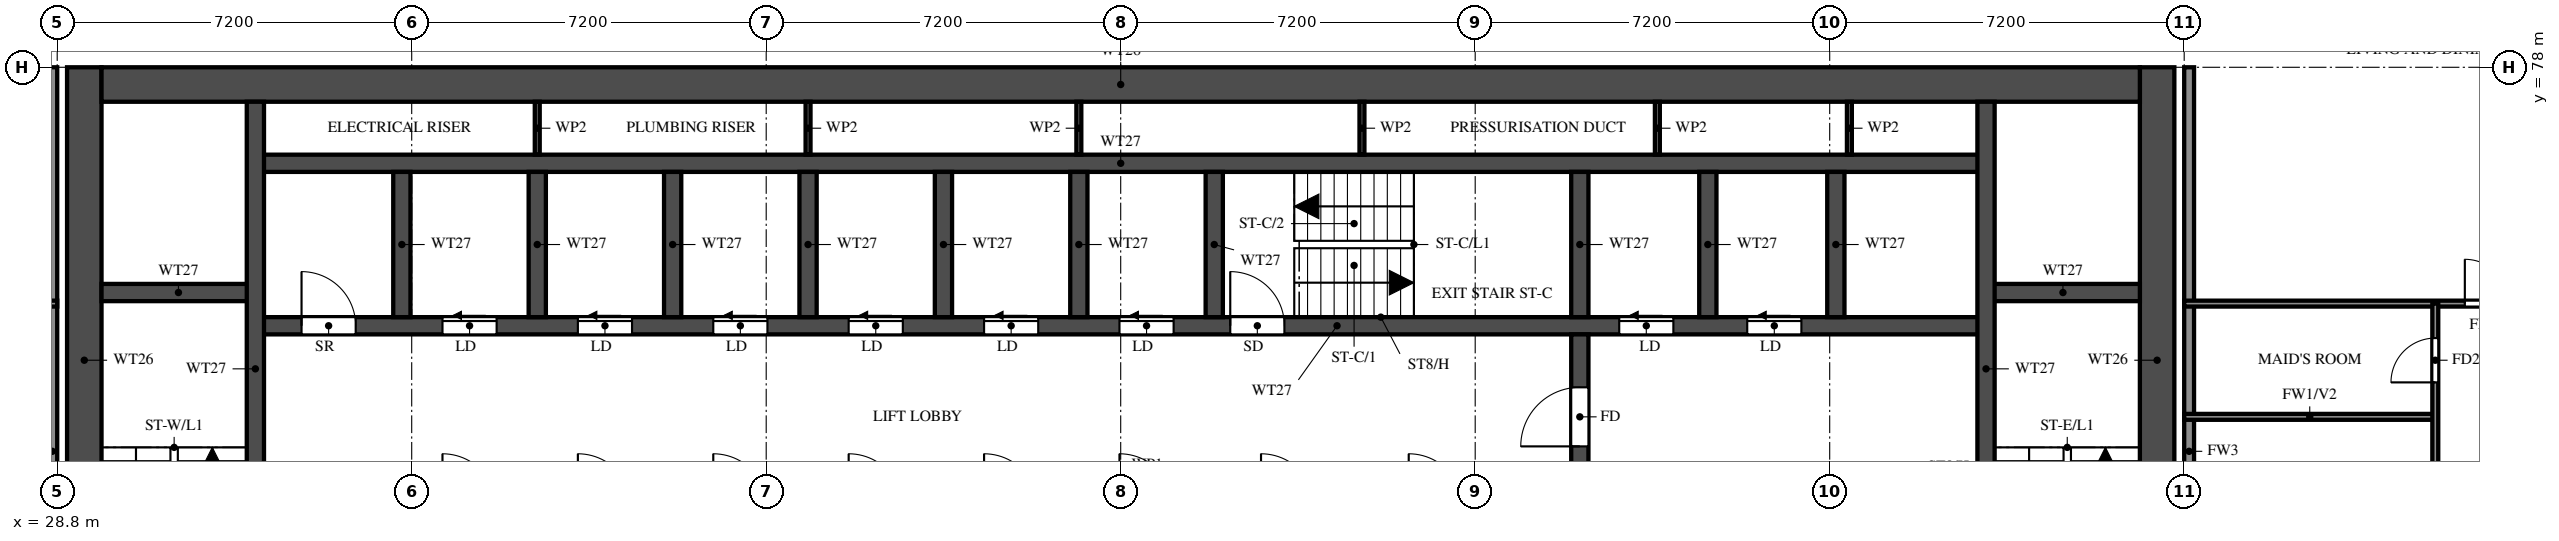
"""IFC4 building model, lengths in metres.
Left out: names, types, materials, properties, quantities, classifications, styles, units other than length and angle.
Written with IfcOpenShell. Run it as: python <this file> out.ifc"""

import sys

from ifc_helpers import new_model, si_unit, direction, frame, frame_2d, origin, place, context, subcontext, project, spatial, rectangle, extrude, element, fill, save


model = new_model("IFC4")
c1 = context("Model", 3, precision=1e-05, world=origin(), true_north=direction((0.0, 1.0)))
c2 = subcontext(c1, "Body", "Model", "MODEL_VIEW")
j1 = project(units=[si_unit("LENGTHUNIT", "METRE"), si_unit("PLANEANGLEUNIT", "RADIAN")], contexts=[c1])
p1 = place(None, origin())
s1 = spatial("IfcSite", under=j1, at=p1, CompositionType="ELEMENT")
p2 = place(p1, origin())
s2 = spatial("IfcBuilding", under=s1, at=p2, CompositionType="ELEMENT")
p3 = place(p2, frame((0.0, 0.0, 150.0)))
s3 = spatial("IfcBuildingStorey", under=s2, at=p3, CompositionType="ELEMENT", Elevation=150.0)
for number, where, z_axis, x_axis in (
    (1, (29.35, 66.1, 0.0), (0.0, 0.0, 1.0), (0.0, 1.0, 0.0)),
    (2, (71.45, 66.1, 0.0), (0.0, 0.0, 1.0), (0.0, 1.0, 0.0)),
):
    element("IfcWall", number, at=place(p3, frame(where, z_axis=z_axis, x_axis=x_axis)), inside=s3, PredefinedType="SHEAR", context=c2, shape_type="SweptSolid", body=[
        extrude(rectangle(XDim=11.9, YDim=0.7, at=frame_2d((5.95, 0.0))), origin(), (0.0, 0.0, 1.0), 3.2),
    ])
p4 = place(p3, frame((29.7, 77.65, 0.0), z_axis=(0.0, 0.0, 1.0), x_axis=(1.0, 0.0, 0.0)))
e3 = element("IfcWall", 3, at=p4, inside=s3, PredefinedType="SHEAR", context=c2, shape_type="SweptSolid", body=[
    extrude(rectangle(XDim=41.4, YDim=0.7, at=frame_2d((20.7, 0.0))), origin(), (0.0, 0.0, 1.0), 3.2),
])
p5 = place(p3, frame((32.825, 72.75, 0.0), z_axis=(0.0, 0.0, 1.0), x_axis=(1.0, 0.0, 0.0)))
e4 = element("IfcWall", 4, at=p5, inside=s3, PredefinedType="SHEAR", context=c2, shape_type="SweptSolid", body=[
    extrude(rectangle(XDim=35.15, YDim=0.35, at=frame_2d((17.575, 0.0))), origin(), (0.0, 0.0, 1.0), 3.2),
])
p6 = place(p5, frame((19.8, 0.0, 0.0)))
e5 = element("IfcOpeningElement", 5, at=p6, cuts=e4, PredefinedType="OPENING", context=c2, shape_type="SweptSolid", body=[
    extrude(rectangle(XDim=1.1, YDim=2.1, at=frame_2d((0.55, 1.05))), frame((0.0, 0.185, 0.0), z_axis=(0.0, -1.0, 0.0), x_axis=(1.0, 0.0, 0.0)), (0.0, 0.0, 1.0), 0.37),
])
p7 = place(p5, frame((27.7, 0.0, 0.0)))
e6 = element("IfcOpeningElement", 6, at=p7, cuts=e4, PredefinedType="OPENING", context=c2, shape_type="SweptSolid", body=[
    extrude(rectangle(XDim=1.1, YDim=2.1, at=frame_2d((0.55, 1.05))), frame((0.0, 0.185, 0.0), z_axis=(0.0, -1.0, 0.0), x_axis=(1.0, 0.0, 0.0)), (0.0, 0.0, 1.0), 0.37),
])
p8 = place(p5, frame((30.3, 0.0, 0.0)))
e7 = element("IfcOpeningElement", 7, at=p8, cuts=e4, PredefinedType="OPENING", context=c2, shape_type="SweptSolid", body=[
    extrude(rectangle(XDim=1.1, YDim=2.1, at=frame_2d((0.55, 1.05))), frame((0.0, 0.185, 0.0), z_axis=(0.0, -1.0, 0.0), x_axis=(1.0, 0.0, 0.0)), (0.0, 0.0, 1.0), 0.37),
])
p9 = place(p5, frame((3.8, 0.0, 0.0)))
e8 = element("IfcOpeningElement", 8, at=p9, cuts=e4, PredefinedType="OPENING", context=c2, shape_type="SweptSolid", body=[
    extrude(rectangle(XDim=1.1, YDim=2.1, at=frame_2d((0.55, 1.05))), frame((0.0, 0.185, 0.0), z_axis=(0.0, -1.0, 0.0), x_axis=(1.0, 0.0, 0.0)), (0.0, 0.0, 1.0), 0.37),
])
p10 = place(p5, frame((6.55, 0.0, 0.0)))
e9 = element("IfcOpeningElement", 9, at=p10, cuts=e4, PredefinedType="OPENING", context=c2, shape_type="SweptSolid", body=[
    extrude(rectangle(XDim=1.1, YDim=2.1, at=frame_2d((0.55, 1.05))), frame((0.0, 0.185, 0.0), z_axis=(0.0, -1.0, 0.0), x_axis=(1.0, 0.0, 0.0)), (0.0, 0.0, 1.0), 0.37),
])
p11 = place(p5, frame((9.3, 0.0, 0.0)))
e10 = element("IfcOpeningElement", 10, at=p11, cuts=e4, PredefinedType="OPENING", context=c2, shape_type="SweptSolid", body=[
    extrude(rectangle(XDim=1.1, YDim=2.1, at=frame_2d((0.55, 1.05))), frame((0.0, 0.185, 0.0), z_axis=(0.0, -1.0, 0.0), x_axis=(1.0, 0.0, 0.0)), (0.0, 0.0, 1.0), 0.37),
])
p12 = place(p5, frame((12.05, 0.0, 0.0)))
e11 = element("IfcOpeningElement", 11, at=p12, cuts=e4, PredefinedType="OPENING", context=c2, shape_type="SweptSolid", body=[
    extrude(rectangle(XDim=1.1, YDim=2.1, at=frame_2d((0.55, 1.05))), frame((0.0, 0.185, 0.0), z_axis=(0.0, -1.0, 0.0), x_axis=(1.0, 0.0, 0.0)), (0.0, 0.0, 1.0), 0.37),
])
p13 = place(p5, frame((14.8, 0.0, 0.0)))
e12 = element("IfcOpeningElement", 12, at=p13, cuts=e4, PredefinedType="OPENING", context=c2, shape_type="SweptSolid", body=[
    extrude(rectangle(XDim=1.1, YDim=2.1, at=frame_2d((0.55, 1.05))), frame((0.0, 0.185, 0.0), z_axis=(0.0, -1.0, 0.0), x_axis=(1.0, 0.0, 0.0)), (0.0, 0.0, 1.0), 0.37),
])
p14 = place(p5, frame((17.55, 0.0, 0.0)))
e13 = element("IfcOpeningElement", 13, at=p14, cuts=e4, PredefinedType="OPENING", context=c2, shape_type="SweptSolid", body=[
    extrude(rectangle(XDim=1.1, YDim=2.1, at=frame_2d((0.55, 1.05))), frame((0.0, 0.185, 0.0), z_axis=(0.0, -1.0, 0.0), x_axis=(1.0, 0.0, 0.0)), (0.0, 0.0, 1.0), 0.37),
])
p15 = place(p5, frame((0.938, 0.0, 0.0)))
e14 = element("IfcOpeningElement", 14, at=p15, cuts=e4, PredefinedType="OPENING", context=c2, shape_type="SweptSolid", body=[
    extrude(rectangle(XDim=1.1, YDim=2.1, at=frame_2d((0.55, 1.05))), frame((0.0, 0.185, 0.0), z_axis=(0.0, -1.0, 0.0), x_axis=(1.0, 0.0, 0.0)), (0.0, 0.0, 1.0), 0.37),
])
p16 = place(p3, frame((32.825, 76.05, 0.0), z_axis=(0.0, 0.0, 1.0), x_axis=(1.0, 0.0, 0.0)))
e15 = element("IfcWall", 15, at=p16, inside=s3, PredefinedType="SHEAR", context=c2, shape_type="SweptSolid", body=[
    extrude(rectangle(XDim=35.15, YDim=0.35, at=frame_2d((17.575, 0.0))), origin(), (0.0, 0.0, 1.0), 3.2),
])
for number, where, z_axis, x_axis in (
    (16, (29.7, 73.425, 0.0), (0.0, 0.0, 1.0), (1.0, 0.0, 0.0)),
    (17, (67.975, 73.425, 0.0), (0.0, 0.0, 1.0), (1.0, 0.0, 0.0)),
):
    element("IfcWall", number, at=place(p3, frame(where, z_axis=z_axis, x_axis=x_axis)), inside=s3, PredefinedType="SHEAR", context=c2, shape_type="SweptSolid", body=[
        extrude(rectangle(XDim=3.125, YDim=0.35, at=frame_2d((1.562, 0.0))), origin(), (0.0, 0.0, 1.0), 3.2),
    ])
p17 = place(p3, frame((32.825, 66.45, 0.0), z_axis=(0.0, 0.0, 1.0), x_axis=(0.0, 1.0, 0.0)))
e18 = element("IfcWall", 18, at=p17, inside=s3, PredefinedType="SHEAR", context=c2, shape_type="SweptSolid", body=[
    extrude(rectangle(XDim=10.85, YDim=0.35, at=frame_2d((5.425, 0.0))), origin(), (0.0, 0.0, 1.0), 3.2),
])
p18 = place(p3, frame((67.975, 66.45, 0.0), z_axis=(0.0, 0.0, 1.0), x_axis=(0.0, 1.0, 0.0)))
e19 = element("IfcWall", 19, at=p18, inside=s3, PredefinedType="SHEAR", context=c2, shape_type="SweptSolid", body=[
    extrude(rectangle(XDim=10.85, YDim=0.35, at=frame_2d((5.425, 0.0))), origin(), (0.0, 0.0, 1.0), 3.2),
])
p19 = place(p18, frame((0.15, 0.0, 0.0)))
e20 = element("IfcOpeningElement", 20, at=p19, cuts=e19, PredefinedType="OPENING", context=c2, shape_type="SweptSolid", body=[
    extrude(rectangle(XDim=1.1, YDim=2.1, at=frame_2d((0.55, 1.05))), frame((0.0, 0.185, 0.0), z_axis=(0.0, -1.0, 0.0), x_axis=(1.0, 0.0, 0.0)), (0.0, 0.0, 1.0), 0.37),
])
p20 = place(p3, frame((59.725, 66.45, 0.0), z_axis=(0.0, 0.0, 1.0), x_axis=(0.0, 1.0, 0.0)))
e21 = element("IfcWall", 21, at=p20, inside=s3, PredefinedType="SHEAR", context=c2, shape_type="SweptSolid", body=[
    extrude(rectangle(XDim=6.125, YDim=0.35, at=frame_2d((3.062, 0.0))), origin(), (0.0, 0.0, 1.0), 3.2),
])
p21 = place(p20, frame((3.85, 0.0, 0.0)))
e22 = element("IfcOpeningElement", 22, at=p21, cuts=e21, PredefinedType="OPENING", context=c2, shape_type="SweptSolid", body=[
    extrude(rectangle(XDim=1.2, YDim=2.1, at=frame_2d((0.6, 1.05))), frame((0.0, 0.185, 0.0), z_axis=(0.0, -1.0, 0.0), x_axis=(1.0, 0.0, 0.0)), (0.0, 0.0, 1.0), 0.37),
])
for number, where, z_axis, x_axis in (
    (23, (59.725, 72.925, 0.0), (0.0, 0.0, 1.0), (0.0, 1.0, 0.0)),
    (24, (35.8, 72.925, 0.0), (0.0, 0.0, 1.0), (0.0, 1.0, 0.0)),
    (25, (38.55, 72.925, 0.0), (0.0, 0.0, 1.0), (0.0, 1.0, 0.0)),
    (26, (41.3, 72.925, 0.0), (0.0, 0.0, 1.0), (0.0, 1.0, 0.0)),
    (27, (44.05, 72.925, 0.0), (0.0, 0.0, 1.0), (0.0, 1.0, 0.0)),
    (28, (46.8, 72.925, 0.0), (0.0, 0.0, 1.0), (0.0, 1.0, 0.0)),
    (29, (49.55, 72.925, 0.0), (0.0, 0.0, 1.0), (0.0, 1.0, 0.0)),
    (30, (52.3, 72.925, 0.0), (0.0, 0.0, 1.0), (0.0, 1.0, 0.0)),
    (31, (62.325, 72.925, 0.0), (0.0, 0.0, 1.0), (0.0, 1.0, 0.0)),
    (32, (64.925, 72.925, 0.0), (0.0, 0.0, 1.0), (0.0, 1.0, 0.0)),
):
    element("IfcWall", number, at=place(p3, frame(where, z_axis=z_axis, x_axis=x_axis)), inside=s3, PredefinedType="SHEAR", context=c2, shape_type="SweptSolid", body=[
        extrude(rectangle(XDim=2.95, YDim=0.35, at=frame_2d((1.475, 0.0))), origin(), (0.0, 0.0, 1.0), 3.2),
    ])
for number, where, z_axis, x_axis in (
    (33, (38.55, 76.225, 0.0), (0.0, 0.0, 1.0), (0.0, 1.0, 0.0)),
    (34, (44.05, 76.225, 0.0), (0.0, 0.0, 1.0), (0.0, 1.0, 0.0)),
    (35, (49.55, 76.225, 0.0), (0.0, 0.0, 1.0), (0.0, 1.0, 0.0)),
    (36, (55.3, 76.225, 0.0), (0.0, 0.0, 1.0), (0.0, 1.0, 0.0)),
    (37, (61.3, 76.225, 0.0), (0.0, 0.0, 1.0), (0.0, 1.0, 0.0)),
    (38, (65.2, 76.225, 0.0), (0.0, 0.0, 1.0), (0.0, 1.0, 0.0)),
):
    element("IfcWall", number, at=place(p3, frame(where, z_axis=z_axis, x_axis=x_axis)), inside=s3, PredefinedType="PARTITIONING", context=c2, shape_type="SweptSolid", body=[
        extrude(rectangle(XDim=1.075, YDim=0.1, at=frame_2d((0.538, 0.0))), origin(), (0.0, 0.0, 1.0), 3.2),
    ])
for number, where, z_axis, x_axis in (
    (39, (28.7, 62.4, 0.0), (0.0, 0.0, 1.0), (0.0, 1.0, 0.0)),
    (40, (72.1, 62.4, 0.0), (0.0, 0.0, 1.0), (0.0, 1.0, 0.0)),
):
    element("IfcWall", number, at=place(p3, frame(where, z_axis=z_axis, x_axis=x_axis)), inside=s3, PredefinedType="SOLIDWALL", context=c2, shape_type="SweptSolid", body=[
        extrude(rectangle(XDim=15.6, YDim=0.2, at=frame_2d((7.8, 0.0))), origin(), (0.0, 0.0, 1.0), 3.2),
    ])
p22 = place(p3, frame((72.0, 70.9, 0.0), z_axis=(0.0, 0.0, 1.0), x_axis=(1.0, 0.0, 0.0)))
e41 = element("IfcWall", 41, at=p22, inside=s3, PredefinedType="PARTITIONING", context=c2, shape_type="SweptSolid", body=[
    extrude(rectangle(XDim=5.1, YDim=0.12, at=frame_2d((2.55, 0.0))), origin(), (0.0, 0.0, 1.0), 3.2),
])
p23 = place(p3, frame((14.525, 73.2, 0.0), z_axis=(0.0, 0.0, 1.0), x_axis=(1.0, 0.0, 0.0)))
e42 = element("IfcWall", 42, at=p23, inside=s3, PredefinedType="PARTITIONING", context=c2, shape_type="SweptSolid", body=[
    extrude(rectangle(XDim=14.275, YDim=0.12, at=frame_2d((7.138, 0.0))), origin(), (0.0, 0.0, 1.0), 2.3),
])
p24 = place(p23, frame((7.675, 0.0, 0.0)))
e43 = element("IfcOpeningElement", 43, at=p24, cuts=e42, PredefinedType="OPENING", context=c2, shape_type="SweptSolid", body=[
    extrude(rectangle(XDim=0.9, YDim=2.1, at=frame_2d((0.45, 1.05))), frame((0.0, 0.07, 0.0), z_axis=(0.0, -1.0, 0.0), x_axis=(1.0, 0.0, 0.0)), (0.0, 0.0, 1.0), 0.14),
])
p25 = place(p3, frame((72.0, 73.2, 0.0), z_axis=(0.0, 0.0, 1.0), x_axis=(1.0, 0.0, 0.0)))
e44 = element("IfcWall", 44, at=p25, inside=s3, PredefinedType="PARTITIONING", context=c2, shape_type="SweptSolid", body=[
    extrude(rectangle(XDim=14.275, YDim=0.12, at=frame_2d((7.137, 0.0))), origin(), (0.0, 0.0, 1.0), 2.3),
])
p26 = place(p25, frame((5.7, 0.0, 0.0)))
e45 = element("IfcOpeningElement", 45, at=p26, cuts=e44, PredefinedType="OPENING", context=c2, shape_type="SweptSolid", body=[
    extrude(rectangle(XDim=0.9, YDim=2.1, at=frame_2d((0.45, 1.05))), frame((0.0, 0.07, 0.0), z_axis=(0.0, -1.0, 0.0), x_axis=(1.0, 0.0, 0.0)), (0.0, 0.0, 1.0), 0.14),
])
p27 = place(p3, frame((77.1, 61.2, 0.0), z_axis=(0.0, 0.0, 1.0), x_axis=(0.0, 1.0, 0.0)))
e46 = element("IfcWall", 46, at=p27, inside=s3, PredefinedType="PARTITIONING", context=c2, shape_type="SweptSolid", body=[
    extrude(rectangle(XDim=12.0, YDim=0.12, at=frame_2d((6.0, 0.0))), origin(), (0.0, 0.0, 1.0), 3.2),
])
p28 = place(p27, frame((5.45, 0.0, 0.0)))
e47 = element("IfcOpeningElement", 47, at=p28, cuts=e46, PredefinedType="OPENING", context=c2, shape_type="SweptSolid", body=[
    extrude(rectangle(XDim=0.8, YDim=2.1, at=frame_2d((0.4, 1.05))), frame((0.0, 0.07, 0.0), z_axis=(0.0, -1.0, 0.0), x_axis=(1.0, 0.0, 0.0)), (0.0, 0.0, 1.0), 0.14),
])
p29 = place(p27, frame((7.975, 0.0, 0.0)))
e48 = element("IfcOpeningElement", 48, at=p29, cuts=e46, PredefinedType="OPENING", context=c2, shape_type="SweptSolid", body=[
    extrude(rectangle(XDim=0.8, YDim=2.1, at=frame_2d((0.4, 1.05))), frame((0.0, 0.07, 0.0), z_axis=(0.0, -1.0, 0.0), x_axis=(1.0, 0.0, 0.0)), (0.0, 0.0, 1.0), 0.14),
])
p30 = place(p27, frame((10.4, 0.0, 0.0)))
e49 = element("IfcOpeningElement", 49, at=p30, cuts=e46, PredefinedType="OPENING", context=c2, shape_type="SweptSolid", body=[
    extrude(rectangle(XDim=0.9, YDim=2.1, at=frame_2d((0.45, 1.05))), frame((0.0, 0.07, 0.0), z_axis=(0.0, -1.0, 0.0), x_axis=(1.0, 0.0, 0.0)), (0.0, 0.0, 1.0), 0.14),
])
p31 = place(p6, origin())
e50 = element("IfcDoor", 50, at=p31, inside=s3, OperationType="SINGLE_SWING_LEFT", PredefinedType="DOOR", context=c2, shape_type="SweptSolid", body=[
    extrude(rectangle(XDim=1.1, YDim=2.1, at=frame_2d((0.55, 1.05))), frame((0.0, 0.025, 0.0), z_axis=(0.0, -1.0, 0.0), x_axis=(1.0, 0.0, 0.0)), (0.0, 0.0, 1.0), 0.05),
])
fill(e5, e50)
p32 = place(p21, origin())
e51 = element("IfcDoor", 51, at=p32, inside=s3, OperationType="SINGLE_SWING_LEFT", PredefinedType="DOOR", context=c2, shape_type="SweptSolid", body=[
    extrude(rectangle(XDim=1.2, YDim=2.1, at=frame_2d((0.6, 1.05))), frame((0.0, 0.025, 0.0), z_axis=(0.0, -1.0, 0.0), x_axis=(1.0, 0.0, 0.0)), (0.0, 0.0, 1.0), 0.05),
])
fill(e22, e51)
p33 = place(p7, origin())
e52 = element("IfcDoor", 52, at=p33, inside=s3, OperationType="SLIDING_TO_LEFT", PredefinedType="DOOR", context=c2, shape_type="SweptSolid", body=[
    extrude(rectangle(XDim=1.1, YDim=2.1, at=frame_2d((0.55, 1.05))), frame((0.0, 0.025, 0.0), z_axis=(0.0, -1.0, 0.0), x_axis=(1.0, 0.0, 0.0)), (0.0, 0.0, 1.0), 0.05),
])
fill(e6, e52)
p34 = place(p8, origin())
e53 = element("IfcDoor", 53, at=p34, inside=s3, OperationType="SLIDING_TO_LEFT", PredefinedType="DOOR", context=c2, shape_type="SweptSolid", body=[
    extrude(rectangle(XDim=1.1, YDim=2.1, at=frame_2d((0.55, 1.05))), frame((0.0, 0.025, 0.0), z_axis=(0.0, -1.0, 0.0), x_axis=(1.0, 0.0, 0.0)), (0.0, 0.0, 1.0), 0.05),
])
fill(e7, e53)
p35 = place(p9, origin())
e54 = element("IfcDoor", 54, at=p35, inside=s3, OperationType="SLIDING_TO_LEFT", PredefinedType="DOOR", context=c2, shape_type="SweptSolid", body=[
    extrude(rectangle(XDim=1.1, YDim=2.1, at=frame_2d((0.55, 1.05))), frame((0.0, 0.025, 0.0), z_axis=(0.0, -1.0, 0.0), x_axis=(1.0, 0.0, 0.0)), (0.0, 0.0, 1.0), 0.05),
])
fill(e8, e54)
p36 = place(p10, origin())
e55 = element("IfcDoor", 55, at=p36, inside=s3, OperationType="SLIDING_TO_LEFT", PredefinedType="DOOR", context=c2, shape_type="SweptSolid", body=[
    extrude(rectangle(XDim=1.1, YDim=2.1, at=frame_2d((0.55, 1.05))), frame((0.0, 0.025, 0.0), z_axis=(0.0, -1.0, 0.0), x_axis=(1.0, 0.0, 0.0)), (0.0, 0.0, 1.0), 0.05),
])
fill(e9, e55)
p37 = place(p11, origin())
e56 = element("IfcDoor", 56, at=p37, inside=s3, OperationType="SLIDING_TO_LEFT", PredefinedType="DOOR", context=c2, shape_type="SweptSolid", body=[
    extrude(rectangle(XDim=1.1, YDim=2.1, at=frame_2d((0.55, 1.05))), frame((0.0, 0.025, 0.0), z_axis=(0.0, -1.0, 0.0), x_axis=(1.0, 0.0, 0.0)), (0.0, 0.0, 1.0), 0.05),
])
fill(e10, e56)
p38 = place(p12, origin())
e57 = element("IfcDoor", 57, at=p38, inside=s3, OperationType="SLIDING_TO_LEFT", PredefinedType="DOOR", context=c2, shape_type="SweptSolid", body=[
    extrude(rectangle(XDim=1.1, YDim=2.1, at=frame_2d((0.55, 1.05))), frame((0.0, 0.025, 0.0), z_axis=(0.0, -1.0, 0.0), x_axis=(1.0, 0.0, 0.0)), (0.0, 0.0, 1.0), 0.05),
])
fill(e11, e57)
p39 = place(p13, origin())
e58 = element("IfcDoor", 58, at=p39, inside=s3, OperationType="SLIDING_TO_LEFT", PredefinedType="DOOR", context=c2, shape_type="SweptSolid", body=[
    extrude(rectangle(XDim=1.1, YDim=2.1, at=frame_2d((0.55, 1.05))), frame((0.0, 0.025, 0.0), z_axis=(0.0, -1.0, 0.0), x_axis=(1.0, 0.0, 0.0)), (0.0, 0.0, 1.0), 0.05),
])
fill(e12, e58)
p40 = place(p14, origin())
e59 = element("IfcDoor", 59, at=p40, inside=s3, OperationType="SLIDING_TO_LEFT", PredefinedType="DOOR", context=c2, shape_type="SweptSolid", body=[
    extrude(rectangle(XDim=1.1, YDim=2.1, at=frame_2d((0.55, 1.05))), frame((0.0, 0.025, 0.0), z_axis=(0.0, -1.0, 0.0), x_axis=(1.0, 0.0, 0.0)), (0.0, 0.0, 1.0), 0.05),
])
fill(e13, e59)
p41 = place(p15, origin())
e60 = element("IfcDoor", 60, at=p41, inside=s3, OperationType="SINGLE_SWING_LEFT", PredefinedType="DOOR", context=c2, shape_type="SweptSolid", body=[
    extrude(rectangle(XDim=1.1, YDim=2.1, at=frame_2d((0.55, 1.05))), frame((0.0, 0.025, 0.0), z_axis=(0.0, -1.0, 0.0), x_axis=(1.0, 0.0, 0.0)), (0.0, 0.0, 1.0), 0.05),
])
fill(e14, e60)
p42 = place(p26, origin())
e61 = element("IfcDoor", 61, at=p42, inside=s3, OperationType="SINGLE_SWING_LEFT", PredefinedType="DOOR", context=c2, shape_type="SweptSolid", body=[
    extrude(rectangle(XDim=0.9, YDim=2.1, at=frame_2d((0.45, 1.05))), frame((0.0, 0.025, 0.0), z_axis=(0.0, -1.0, 0.0), x_axis=(1.0, 0.0, 0.0)), (0.0, 0.0, 1.0), 0.05),
])
fill(e45, e61)
p43 = place(p30, origin())
e62 = element("IfcDoor", 62, at=p43, inside=s3, OperationType="SINGLE_SWING_RIGHT", PredefinedType="DOOR", context=c2, shape_type="SweptSolid", body=[
    extrude(rectangle(XDim=0.9, YDim=2.1, at=frame_2d((0.45, 1.05))), frame((0.0, 0.025, 0.0), z_axis=(0.0, -1.0, 0.0), x_axis=(1.0, 0.0, 0.0)), (0.0, 0.0, 1.0), 0.05),
])
fill(e49, e62)
save(model, sys.argv[1])
